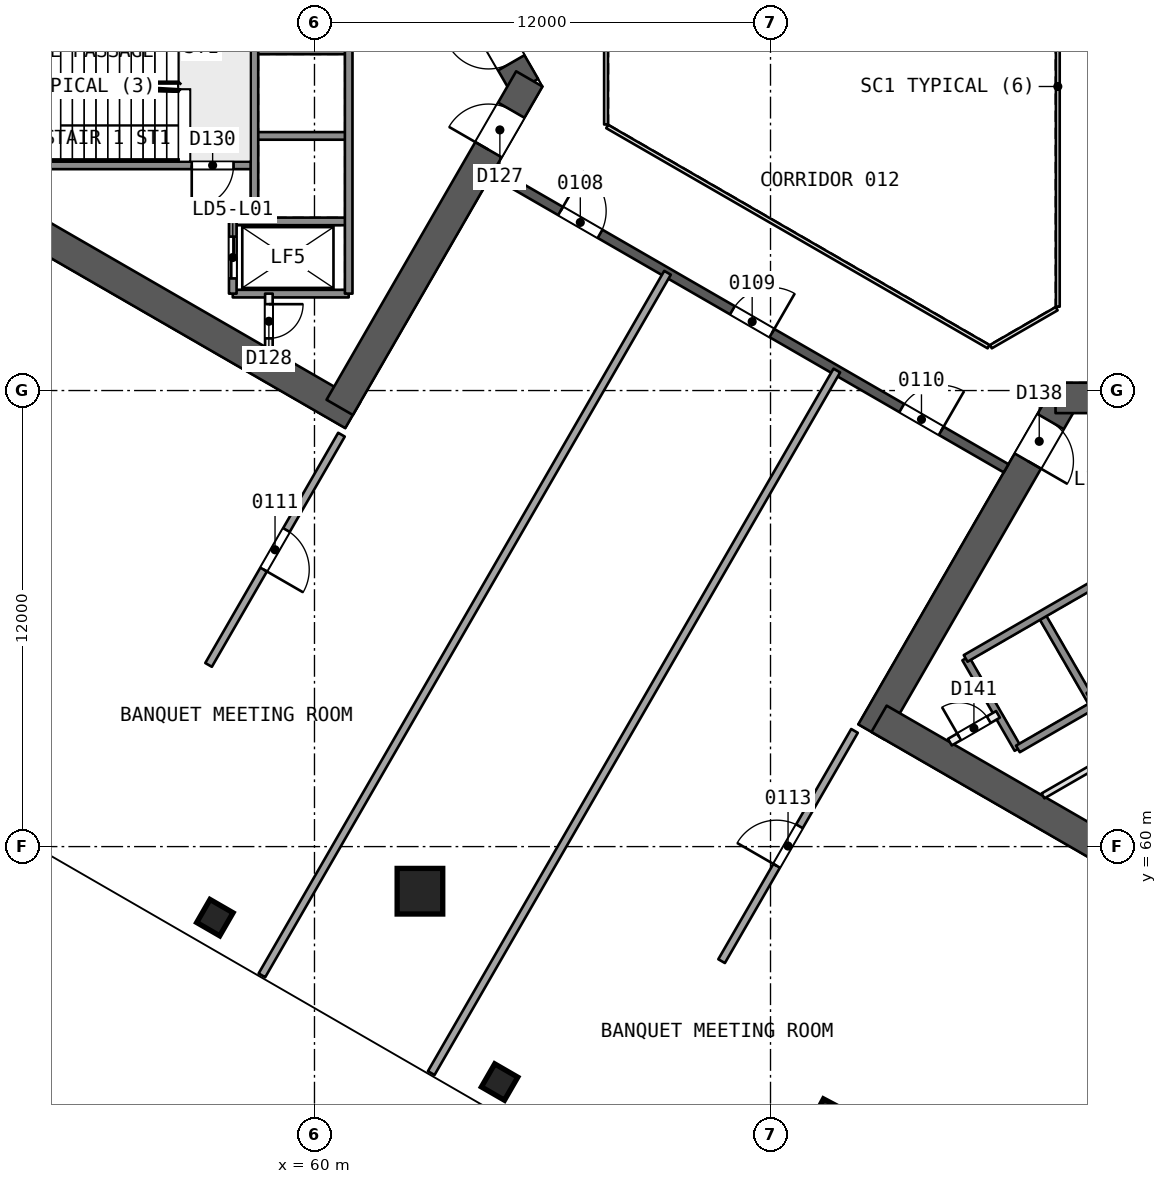
"""IFC4 building model, lengths in metres.
Left out: names, types, materials, properties, quantities, classifications, styles, units other than length and angle.
Written with IfcOpenShell. Run it as: python <this file> out.ifc"""

import sys

from ifc_helpers import new_model, si_unit, direction, frame, frame_2d, origin, origin_2d, place, context, subcontext, project, spatial, rectangle, extrude, element, fill, save


model = new_model("IFC4")
c1 = context("Model", 3, precision=1e-05, world=origin(), true_north=direction((0.0, 1.0)))
c2 = subcontext(c1, "Body", "Model", "MODEL_VIEW")
j1 = project(units=[si_unit("LENGTHUNIT", "METRE"), si_unit("PLANEANGLEUNIT", "RADIAN")], contexts=[c1])
p1 = place(None, origin())
s1 = spatial("IfcSite", under=j1, at=p1, CompositionType="ELEMENT")
p2 = place(p1, origin())
s2 = spatial("IfcBuilding", under=s1, at=p2, CompositionType="ELEMENT")
p3 = place(p2, frame((0.0, 0.0, 9.0)))
s3 = spatial("IfcBuildingStorey", under=s2, at=p3, CompositionType="ELEMENT", Elevation=9.0)
p4 = place(p3, frame((65.538, 80.0, 0.0), z_axis=(0.0, 0.0, 1.0), x_axis=(-0.49999662545, 0.866027352073, 0.0)))
e1 = element("IfcWall", 1, at=p4, inside=s3, PredefinedType="SHEAR", context=c2, shape_type="SweptSolid", body=[
    extrude(rectangle(XDim=10.149, YDim=0.8, at=frame_2d((5.074, 0.0))), origin(), (0.0, 0.0, 1.0), 6.0),
])
p5 = place(p4, frame((0.719, 0.0, 0.0)))
e2 = element("IfcOpeningElement", 2, at=p5, cuts=e1, PredefinedType="OPENING", context=c2, shape_type="SweptSolid", body=[
    extrude(rectangle(XDim=1.2, YDim=2.1, at=frame_2d((0.6, 1.05))), frame((0.0, 0.411, 0.0), z_axis=(0.0, -1.0, 0.0), x_axis=(1.0, 0.0, 0.0)), (0.0, 0.0, 1.0), 0.821),
])
p6 = place(p3, frame((48.797, 78.408, 0.0), z_axis=(0.0, 0.0, 1.0), x_axis=(0.866032504327, -0.499987701298, 0.0)))
e3 = element("IfcWall", 3, at=p6, inside=s3, PredefinedType="SHEAR", context=c2, shape_type="SweptSolid", body=[
    extrude(rectangle(XDim=14.102, YDim=0.8, at=frame_2d((7.051, 0.0))), origin(), (0.0, 0.0, 1.0), 6.0),
])
p7 = place(p3, frame((60.664, 71.557, 0.0), z_axis=(0.0, 0.0, 1.0), x_axis=(0.50000409368, 0.866023040284, 0.0)))
e4 = element("IfcWall", 4, at=p7, inside=s3, PredefinedType="SHEAR", context=c2, shape_type="SweptSolid", body=[
    extrude(rectangle(XDim=9.98, YDim=0.8, at=frame_2d((4.99, 0.0))), origin(), (0.0, 0.0, 1.0), 6.0),
])
p8 = place(p7, frame((7.83, 0.0, 0.0)))
e5 = element("IfcOpeningElement", 5, at=p8, cuts=e4, PredefinedType="OPENING", context=c2, shape_type="SweptSolid", body=[
    extrude(rectangle(XDim=1.2, YDim=2.1, at=frame_2d((0.6, 1.05))), frame((0.0, 0.411, 0.0), z_axis=(0.0, -1.0, 0.0), x_axis=(1.0, 0.0, 0.0)), (0.0, 0.0, 1.0), 0.821),
])
p9 = place(p3, frame((79.731, 71.806, 0.0), z_axis=(0.0, 0.0, 1.0), x_axis=(-0.49999662545, -0.866027352073, 0.0)))
e6 = element("IfcWall", 6, at=p9, inside=s3, PredefinedType="SHEAR", context=c2, shape_type="SweptSolid", body=[
    extrude(rectangle(XDim=10.149, YDim=0.8, at=frame_2d((5.074, 0.0))), origin(), (0.0, 0.0, 1.0), 6.0),
])
p10 = place(p9, frame((0.719, 0.0, 0.0)))
e7 = element("IfcOpeningElement", 7, at=p10, cuts=e6, PredefinedType="OPENING", context=c2, shape_type="SweptSolid", body=[
    extrude(rectangle(XDim=1.2, YDim=2.1, at=frame_2d((0.6, 1.05))), frame((0.0, 0.411, 0.0), z_axis=(0.0, -1.0, 0.0), x_axis=(1.0, 0.0, 0.0)), (0.0, 0.0, 1.0), 0.821),
])
p11 = place(p3, frame((74.856, 63.363, 0.0), z_axis=(0.0, 0.0, 1.0), x_axis=(0.866029478545, -0.499992942241, 0.0)))
e8 = element("IfcWall", 8, at=p11, inside=s3, PredefinedType="SHEAR", context=c2, shape_type="SweptSolid", body=[
    extrude(rectangle(XDim=13.933, YDim=0.8, at=frame_2d((6.967, 0.0))), origin(), (0.0, 0.0, 1.0), 6.0),
])
p12 = place(p3, frame((89.48, 71.806, 0.0), z_axis=(0.0, 0.0, 1.0), x_axis=(-1.0, 0.0, 0.0)))
e9 = element("IfcWall", 9, at=p12, inside=s3, PredefinedType="SHEAR", context=c2, shape_type="SweptSolid", body=[
    extrude(rectangle(XDim=9.98, YDim=0.8, at=frame_2d((4.99, 0.0))), origin(), (0.0, 0.0, 1.0), 6.0),
])
p13 = place(p12, frame((7.83, 0.0, 0.0)))
e10 = element("IfcOpeningElement", 10, at=p13, cuts=e9, PredefinedType="OPENING", context=c2, shape_type="SweptSolid", body=[
    extrude(rectangle(XDim=1.2, YDim=2.1, at=frame_2d((0.6, 1.05))), frame((0.0, 0.411, 0.0), z_axis=(0.0, -1.0, 0.0), x_axis=(1.0, 0.0, 0.0)), (0.0, 0.0, 1.0), 0.821),
])
p14 = place(p3, frame((64.7, 77.748, 0.0), z_axis=(0.0, 0.0, 1.0), x_axis=(0.866026492143, -0.499998114903, 0.0)))
e11 = element("IfcWall", 11, at=p14, inside=s3, PredefinedType="SHEAR", context=c2, shape_type="SweptSolid", body=[
    extrude(rectangle(XDim=15.588, YDim=0.25, at=frame_2d((7.794, 0.0))), origin(), (0.0, 0.0, 1.0), 5.6),
])
p15 = place(p14, frame((2.05, 0.0, 0.0)))
e12 = element("IfcOpeningElement", 12, at=p15, cuts=e11, PredefinedType="OPENING", context=c2, shape_type="SweptSolid", body=[
    extrude(rectangle(XDim=1.2, YDim=2.4, at=frame_2d((0.6, 1.2))), frame((0.0, 0.135, 0.0), z_axis=(0.0, -1.0, 0.0), x_axis=(1.0, 0.0, 0.0)), (0.0, 0.0, 1.0), 0.271),
])
p16 = place(p14, frame((7.272, 0.0, 0.0)))
e13 = element("IfcOpeningElement", 13, at=p16, cuts=e11, PredefinedType="OPENING", context=c2, shape_type="SweptSolid", body=[
    extrude(rectangle(XDim=1.2, YDim=2.4, at=frame_2d((0.6, 1.2))), frame((0.0, 0.135, 0.0), z_axis=(0.0, -1.0, 0.0), x_axis=(1.0, 0.0, 0.0)), (0.0, 0.0, 1.0), 0.271),
])
p17 = place(p14, frame((12.417, 0.0, 0.0)))
e14 = element("IfcOpeningElement", 14, at=p17, cuts=e11, PredefinedType="OPENING", context=c2, shape_type="SweptSolid", body=[
    extrude(rectangle(XDim=1.2, YDim=2.4, at=frame_2d((0.6, 1.2))), frame((0.0, 0.135, 0.0), z_axis=(0.0, -1.0, 0.0), x_axis=(1.0, 0.0, 0.0)), (0.0, 0.0, 1.0), 0.271),
])
p18 = place(p3, frame((62.763, 58.805, 0.0), z_axis=(0.010089088034, 0.017493176833, 0.999796078742), x_axis=(-0.866252907906, 0.499605744107, 1.0221e-08)))
e15 = element("IfcColumn", 15, at=p18, inside=s3, PredefinedType="COLUMN", context=c2, shape_type="SweptSolid", body=[
    extrude(rectangle(XDim=1.2, YDim=1.2, at=origin_2d()), origin(), (0.0, 0.0, 1.0), 6.001),
])
p19 = place(p3, frame((73.644, 52.523, 0.0), z_axis=(0.000854269334, 0.022821195063, 0.999739197631), x_axis=(-0.49982434175, -0.865891374883, 0.02019292694)))
e16 = element("IfcColumn", 16, at=p19, inside=s3, PredefinedType="COLUMN", context=c2, shape_type="SweptSolid", body=[
    extrude(rectangle(XDim=1.2, YDim=1.2, at=origin_2d()), origin(), (0.0, 0.0, 1.0), 6.001),
])
for number, where, z_axis, x_axis in (
    (17, (57.379, 58.131, 0.0), (0.0, 0.0, 1.0), (0.5, 0.866, 0.0)),
    (18, (64.871, 53.805, 0.0), (0.0, 0.0, 1.0), (0.5, 0.866, 0.0)),
):
    element("IfcColumn", number, at=place(p3, frame(where, z_axis=z_axis, x_axis=x_axis)), inside=s3, PredefinedType="COLUMN", context=c2, shape_type="SweptSolid", body=[
        extrude(rectangle(XDim=0.7, YDim=0.7, at=origin_2d()), origin(), (0.0, 0.0, 1.0), 6.0),
    ])
p20 = place(p3, frame((58.617, 56.612, 0.0), z_axis=(0.0, 0.0, 1.0), x_axis=(0.500000322675, 0.866025217488, 0.0)))
e19 = element("IfcWall", 19, at=p20, inside=s3, PredefinedType="PARTITIONING", context=c2, shape_type="SweptSolid", body=[
    extrude(rectangle(XDim=21.346, YDim=0.2, at=frame_2d((10.673, 0.0))), origin(), (0.0, 0.0, 1.0), 5.6),
])
p21 = place(p3, frame((60.71, 70.838, 0.0), z_axis=(0.0, 0.0, 1.0), x_axis=(-0.499979261727, -0.866037376701, 0.0)))
e20 = element("IfcWall", 20, at=p21, inside=s3, PredefinedType="PARTITIONING", context=c2, shape_type="SweptSolid", body=[
    extrude(rectangle(XDim=6.995, YDim=0.2, at=frame_2d((3.498, 0.0))), origin(), (0.0, 0.0, 1.0), 5.6),
])
p22 = place(p21, frame((2.897, 0.0, 0.0)))
e21 = element("IfcOpeningElement", 21, at=p22, cuts=e20, PredefinedType="OPENING", context=c2, shape_type="SweptSolid", body=[
    extrude(rectangle(XDim=1.2, YDim=2.4, at=frame_2d((0.6, 1.2))), frame((0.0, 0.11, 0.0), z_axis=(0.0, -1.0, 0.0), x_axis=(1.0, 0.0, 0.0)), (0.0, 0.0, 1.0), 0.221),
])
p23 = place(p3, frame((63.072, 54.04, 0.0), z_axis=(0.0, 0.0, 1.0), x_axis=(0.500005275173, 0.86602235814, 0.0)))
e22 = element("IfcWall", 22, at=p23, inside=s3, PredefinedType="PARTITIONING", context=c2, shape_type="SweptSolid", body=[
    extrude(rectangle(XDim=21.346, YDim=0.2, at=frame_2d((10.673, 0.0))), origin(), (0.0, 0.0, 1.0), 5.6),
])
p24 = place(p3, frame((70.713, 56.986, 0.0), z_axis=(0.0, 0.0, 1.0), x_axis=(0.499979261727, 0.866037376701, 0.0)))
e23 = element("IfcWall", 23, at=p24, inside=s3, PredefinedType="PARTITIONING", context=c2, shape_type="SweptSolid", body=[
    extrude(rectangle(XDim=6.995, YDim=0.2, at=frame_2d((3.498, 0.0))), origin(), (0.0, 0.0, 1.0), 5.6),
])
p25 = place(p24, frame((2.897, 0.0, 0.0)))
e24 = element("IfcOpeningElement", 24, at=p25, cuts=e23, PredefinedType="OPENING", context=c2, shape_type="SweptSolid", body=[
    extrude(rectangle(XDim=1.2, YDim=2.4, at=frame_2d((0.6, 1.2))), frame((0.0, 0.11, 0.0), z_axis=(0.0, -1.0, 0.0), x_axis=(1.0, 0.0, 0.0)), (0.0, 0.0, 1.0), 0.221),
])
for number, where, z_axis, x_axis in (
    (25, (60.9, 80.95, 0.0), (0.0, 0.0, 1.0), (-1.0, 0.0, 0.0)),
    (26, (60.9, 78.7, 0.0), (0.0, 0.0, 1.0), (-1.0, 0.0, 0.0)),
):
    element("IfcWall", number, at=place(p3, frame(where, z_axis=z_axis, x_axis=x_axis)), inside=s3, PredefinedType="SOLIDWALL", context=c2, shape_type="SweptSolid", body=[
        extrude(rectangle(XDim=2.48, YDim=0.2, at=frame_2d((1.24, 0.0))), origin(), (0.0, 0.0, 1.0), 5.6),
    ])
p26 = place(p3, frame((58.42, 77.925, 0.0), z_axis=(0.0, 0.0, 1.0), x_axis=(-1.0, 0.0, 0.0)))
e27 = element("IfcWall", 27, at=p26, inside=s3, PredefinedType="SOLIDWALL", context=c2, shape_type="SweptSolid", body=[
    extrude(rectangle(XDim=7.7, YDim=0.2, at=frame_2d((3.85, 0.0))), origin(), (0.0, 0.0, 1.0), 5.6),
])
p27 = place(p26, frame((0.55, 0.0, 0.0)))
e28 = element("IfcOpeningElement", 28, at=p27, cuts=e27, PredefinedType="OPENING", context=c2, shape_type="SweptSolid", body=[
    extrude(rectangle(XDim=1.1, YDim=2.1, at=frame_2d((0.55, 1.05))), frame((0.0, 0.11, 0.0), z_axis=(0.0, -1.0, 0.0), x_axis=(1.0, 0.0, 0.0)), (0.0, 0.0, 1.0), 0.221),
])
for number, where, z_axis, x_axis in (
    (29, (60.9, 76.45, 0.0), (0.0, 0.0, 1.0), (-1.0, 0.0, 0.0)),
    (30, (60.9, 74.55, 0.0), (0.0, 0.0, 1.0), (-1.0, 0.0, 0.0)),
):
    element("IfcWall", number, at=place(p3, frame(where, z_axis=z_axis, x_axis=x_axis)), inside=s3, PredefinedType="SOLIDWALL", context=c2, shape_type="SweptSolid", body=[
        extrude(rectangle(XDim=3.05, YDim=0.2, at=frame_2d((1.525, 0.0))), origin(), (0.0, 0.0, 1.0), 5.6),
    ])
p28 = place(p3, frame((60.9, 85.45, 0.0), z_axis=(0.0, 0.0, 1.0), x_axis=(0.0, -1.0, 0.0)))
e31 = element("IfcWall", 31, at=p28, inside=s3, PredefinedType="SOLIDWALL", context=c2, shape_type="SweptSolid", body=[
    extrude(rectangle(XDim=10.9, YDim=0.2, at=frame_2d((5.45, 0.0))), origin(), (0.0, 0.0, 1.0), 5.6),
])
p29 = place(p3, frame((58.8, 74.55, 0.0), z_axis=(0.0, 0.0, 1.0), x_axis=(0.0, -1.0, 0.0)))
e32 = element("IfcWall", 32, at=p29, inside=s3, PredefinedType="PARTITIONING", context=c2, shape_type="SweptSolid", body=[
    extrude(rectangle(XDim=1.455, YDim=0.2, at=frame_2d((0.728, 0.0))), origin(), (0.0, 0.0, 1.0), 5.6),
])
p30 = place(p29, frame((0.278, 0.0, 0.0)))
e33 = element("IfcOpeningElement", 33, at=p30, cuts=e32, PredefinedType="OPENING", context=c2, shape_type="SweptSolid", body=[
    extrude(rectangle(XDim=0.9, YDim=2.1, at=frame_2d((0.45, 1.05))), frame((0.0, 0.11, 0.0), z_axis=(0.0, -1.0, 0.0), x_axis=(1.0, 0.0, 0.0)), (0.0, 0.0, 1.0), 0.221),
])
p31 = place(p3, frame((58.42, 85.45, 0.0), z_axis=(0.0, 0.0, 1.0), x_axis=(0.0, -1.0, 0.0)))
e34 = element("IfcWall", 34, at=p31, inside=s3, PredefinedType="SOLIDWALL", context=c2, shape_type="SweptSolid", body=[
    extrude(rectangle(XDim=9.0, YDim=0.2, at=frame_2d((4.5, 0.0))), origin(), (0.0, 0.0, 1.0), 5.6),
])
p32 = place(p3, frame((57.85, 76.45, 0.0), z_axis=(0.0, 0.0, 1.0), x_axis=(0.0, -1.0, 0.0)))
e35 = element("IfcWall", 35, at=p32, inside=s3, PredefinedType="SOLIDWALL", context=c2, shape_type="SweptSolid", body=[
    extrude(rectangle(XDim=1.9, YDim=0.2, at=frame_2d((0.95, 0.0))), origin(), (0.0, 0.0, 1.0), 5.6),
])
p33 = place(p32, frame((0.4, 0.0, 0.0)))
e36 = element("IfcOpeningElement", 36, at=p33, cuts=e35, PredefinedType="OPENING", context=c2, shape_type="SweptSolid", body=[
    extrude(rectangle(XDim=1.1, YDim=2.1, at=frame_2d((0.55, 1.05))), frame((0.0, 0.11, 0.0), z_axis=(0.0, -1.0, 0.0), x_axis=(1.0, 0.0, 0.0)), (0.0, 0.0, 1.0), 0.221),
])
for number, where, z_axis, x_axis in (
    (37, (77.135, 64.952, 0.0), (0.0, 0.0, 1.0), (0.5, -0.866, 0.0)),
    (38, (79.127, 66.102, 0.0), (0.0, 0.0, 1.0), (0.5, -0.866, 0.0)),
):
    element("IfcWall", number, at=place(p3, frame(where, z_axis=z_axis, x_axis=x_axis)), inside=s3, PredefinedType="SOLIDWALL", context=c2, shape_type="SweptSolid", body=[
        extrude(rectangle(XDim=2.75, YDim=0.2, at=frame_2d((1.375, 0.0))), origin(), (0.0, 0.0, 1.0), 5.6),
    ])
p34 = place(p3, frame((77.135, 64.952, 0.0), z_axis=(0.0, 0.0, 1.0), x_axis=(0.866031916153, 0.499988720078, 0.0)))
e39 = element("IfcWall", 39, at=p34, inside=s3, PredefinedType="SOLIDWALL", context=c2, shape_type="SweptSolid", body=[
    extrude(rectangle(XDim=11.35, YDim=0.2, at=frame_2d((5.675, 0.0))), origin(), (0.0, 0.0, 1.0), 5.6),
])
p35 = place(p3, frame((76.72, 62.749, 0.0), z_axis=(0.0, 0.0, 1.0), x_axis=(0.866054810376, 0.49994906283, 0.0)))
e40 = element("IfcWall", 40, at=p35, inside=s3, PredefinedType="PARTITIONING", context=c2, shape_type="SweptSolid", body=[
    extrude(rectangle(XDim=1.461, YDim=0.2, at=frame_2d((0.73, 0.0))), origin(), (0.0, 0.0, 1.0), 5.6),
])
p36 = place(p35, frame((0.281, 0.0, 0.0)))
e41 = element("IfcOpeningElement", 41, at=p36, cuts=e40, PredefinedType="OPENING", context=c2, shape_type="SweptSolid", body=[
    extrude(rectangle(XDim=0.9, YDim=2.1, at=frame_2d((0.45, 1.05))), frame((0.0, 0.11, 0.0), z_axis=(0.0, -1.0, 0.0), x_axis=(1.0, 0.0, 0.0)), (0.0, 0.0, 1.0), 0.221),
])
p37 = place(p3, frame((80.367, 63.954, 0.0), z_axis=(0.0, 0.0, 1.0), x_axis=(0.866026575979, 0.499997969693, 0.0)))
e42 = element("IfcWall", 42, at=p37, inside=s3, PredefinedType="SOLIDWALL", context=c2, shape_type="SweptSolid", body=[
    extrude(rectangle(XDim=6.75, YDim=0.2, at=frame_2d((3.375, 0.0))), origin(), (0.0, 0.0, 1.0), 5.6),
])
p38 = place(p3, frame((78.51, 62.57, 0.0), z_axis=(0.0, 0.0, 1.0), x_axis=(0.866053019151, 0.499952165731, 0.0)))
e43 = element("IfcWall", 43, at=p38, inside=s3, PredefinedType="SOLIDWALL", context=c2, shape_type="SweptSolid", body=[
    extrude(rectangle(XDim=2.3, YDim=0.2, at=frame_2d((1.15, 0.0))), origin(), (0.0, 0.0, 1.0), 5.6),
])
p39 = place(p3, frame((79.17, 61.334, 0.0), z_axis=(0.0, 0.0, 1.0), x_axis=(0.866030041738, 0.499991966744, 0.0)))
e44 = element("IfcWall", 44, at=p39, inside=s3, PredefinedType="PARTITIONING", context=c2, shape_type="SweptSolid", body=[
    extrude(rectangle(XDim=2.222, YDim=0.15, at=frame_2d((1.111, 0.0))), origin(), (0.0, 0.0, 1.0), 5.6),
])
p40 = place(p3, frame((79.56, 74.206, 0.0), z_axis=(0.0, 0.0, 1.0), x_axis=(0.0, 1.0, 0.0)))
e45 = element("IfcWall", 45, at=p40, inside=s3, PredefinedType="PARTITIONING", context=c2, shape_type="SweptSolid", body=[
    extrude(rectangle(XDim=11.588, YDim=0.1, at=frame_2d((5.794, 0.0))), origin(), (0.0, 0.0, 1.0), 5.6),
])
p41 = place(p3, frame((67.672, 81.0, 0.0), z_axis=(0.0, 0.0, 1.0), x_axis=(0.0, -1.0, 0.0)))
e46 = element("IfcWall", 46, at=p41, inside=s3, PredefinedType="PARTITIONING", context=c2, shape_type="SweptSolid", body=[
    extrude(rectangle(XDim=2.0, YDim=0.1, at=frame_2d((1.0, 0.0))), origin(), (0.0, 0.0, 1.0), 5.6),
])
p42 = place(p3, frame((67.702, 78.948, 0.0), z_axis=(0.0, 0.0, 1.0), x_axis=(0.866026658274, -0.499997827154, 0.0)))
e47 = element("IfcWall", 47, at=p42, inside=s3, PredefinedType="PARTITIONING", context=c2, shape_type="SweptSolid", body=[
    extrude(rectangle(XDim=11.588, YDim=0.1, at=frame_2d((5.794, 0.0))), origin(), (0.0, 0.0, 1.0), 5.6),
])
p43 = place(p3, frame((77.798, 73.154, 0.0), z_axis=(0.0, 0.0, 1.0), x_axis=(0.866041268327, 0.499972520799, 0.0)))
e48 = element("IfcWall", 48, at=p43, inside=s3, PredefinedType="PARTITIONING", context=c2, shape_type="SweptSolid", body=[
    extrude(rectangle(XDim=2.0, YDim=0.1, at=frame_2d((1.0, 0.0))), origin(), (0.0, 0.0, 1.0), 5.6),
])
p44 = place(p3, frame((57.191, 52.754, 0.0), z_axis=(0.0, 0.0, 1.0), x_axis=(0.866025403784, -0.5, 0.0)))
e49 = element("IfcColumn", 49, at=p44, inside=s3, PredefinedType="COLUMN", context=c2, shape_type="SweptSolid", body=[
    extrude(rectangle(XDim=1.0, YDim=1.0, at=origin_2d()), origin(), (0.0, 0.0, 1.0), 4.7),
])
p45 = place(p15, origin())
e50 = element("IfcDoor", 50, at=p45, inside=s3, OperationType="SINGLE_SWING_LEFT", PredefinedType="NOTDEFINED", context=c2, shape_type="SweptSolid", body=[
    extrude(rectangle(XDim=1.2, YDim=2.4, at=frame_2d((0.6, 1.2))), frame((0.0, 0.025, 0.0), z_axis=(0.0, -1.0, 0.0), x_axis=(1.0, 0.0, 0.0)), (0.0, 0.0, 1.0), 0.05),
])
fill(e12, e50)
p46 = place(p16, origin())
e51 = element("IfcDoor", 51, at=p46, inside=s3, OperationType="SINGLE_SWING_RIGHT", PredefinedType="NOTDEFINED", context=c2, shape_type="SweptSolid", body=[
    extrude(rectangle(XDim=1.2, YDim=2.4, at=frame_2d((0.6, 1.2))), frame((0.0, 0.025, 0.0), z_axis=(0.0, -1.0, 0.0), x_axis=(1.0, 0.0, 0.0)), (0.0, 0.0, 1.0), 0.05),
])
fill(e13, e51)
p47 = place(p17, origin())
e52 = element("IfcDoor", 52, at=p47, inside=s3, OperationType="SINGLE_SWING_RIGHT", PredefinedType="NOTDEFINED", context=c2, shape_type="SweptSolid", body=[
    extrude(rectangle(XDim=1.2, YDim=2.4, at=frame_2d((0.6, 1.2))), frame((0.0, 0.025, 0.0), z_axis=(0.0, -1.0, 0.0), x_axis=(1.0, 0.0, 0.0)), (0.0, 0.0, 1.0), 0.05),
])
fill(e14, e52)
p48 = place(p22, origin())
e53 = element("IfcDoor", 53, at=p48, inside=s3, OperationType="SINGLE_SWING_RIGHT", PredefinedType="NOTDEFINED", context=c2, shape_type="SweptSolid", body=[
    extrude(rectangle(XDim=1.2, YDim=2.4, at=frame_2d((0.6, 1.2))), frame((0.0, 0.025, 0.0), z_axis=(0.0, -1.0, 0.0), x_axis=(1.0, 0.0, 0.0)), (0.0, 0.0, 1.0), 0.05),
])
fill(e21, e53)
p49 = place(p25, origin())
e54 = element("IfcDoor", 54, at=p49, inside=s3, OperationType="SINGLE_SWING_LEFT", PredefinedType="NOTDEFINED", context=c2, shape_type="SweptSolid", body=[
    extrude(rectangle(XDim=1.2, YDim=2.4, at=frame_2d((0.6, 1.2))), frame((0.0, 0.025, 0.0), z_axis=(0.0, -1.0, 0.0), x_axis=(1.0, 0.0, 0.0)), (0.0, 0.0, 1.0), 0.05),
])
fill(e24, e54)
p50 = place(p5, origin())
e55 = element("IfcDoor", 55, at=p50, inside=s3, OperationType="SINGLE_SWING_RIGHT", PredefinedType="NOTDEFINED", context=c2, shape_type="SweptSolid", body=[
    extrude(rectangle(XDim=1.2, YDim=2.1, at=frame_2d((0.6, 1.05))), frame((0.0, 0.025, 0.0), z_axis=(0.0, -1.0, 0.0), x_axis=(1.0, 0.0, 0.0)), (0.0, 0.0, 1.0), 0.05),
])
fill(e2, e55)
p51 = place(p8, origin())
e56 = element("IfcDoor", 56, at=p51, inside=s3, OperationType="SINGLE_SWING_LEFT", PredefinedType="NOTDEFINED", context=c2, shape_type="SweptSolid", body=[
    extrude(rectangle(XDim=1.2, YDim=2.1, at=frame_2d((0.6, 1.05))), frame((0.0, 0.025, 0.0), z_axis=(0.0, -1.0, 0.0), x_axis=(1.0, 0.0, 0.0)), (0.0, 0.0, 1.0), 0.05),
])
fill(e5, e56)
p52 = place(p33, origin())
e57 = element("IfcDoor", 57, at=p52, inside=s3, OperationType="SLIDING_TO_RIGHT", PredefinedType="NOTDEFINED", context=c2, shape_type="SweptSolid", body=[
    extrude(rectangle(XDim=1.1, YDim=2.1, at=frame_2d((0.55, 1.05))), frame((0.0, 0.025, 0.0), z_axis=(0.0, -1.0, 0.0), x_axis=(1.0, 0.0, 0.0)), (0.0, 0.0, 1.0), 0.05),
])
fill(e36, e57)
p53 = place(p30, origin())
e58 = element("IfcDoor", 58, at=p53, inside=s3, OperationType="SINGLE_SWING_LEFT", PredefinedType="NOTDEFINED", context=c2, shape_type="SweptSolid", body=[
    extrude(rectangle(XDim=0.9, YDim=2.1, at=frame_2d((0.45, 1.05))), frame((0.0, 0.025, 0.0), z_axis=(0.0, -1.0, 0.0), x_axis=(1.0, 0.0, 0.0)), (0.0, 0.0, 1.0), 0.05),
])
fill(e33, e58)
p54 = place(p27, origin())
e59 = element("IfcDoor", 59, at=p54, inside=s3, OperationType="SINGLE_SWING_RIGHT", PredefinedType="NOTDEFINED", context=c2, shape_type="SweptSolid", body=[
    extrude(rectangle(XDim=1.1, YDim=2.1, at=frame_2d((0.55, 1.05))), frame((0.0, 0.025, 0.0), z_axis=(0.0, -1.0, 0.0), x_axis=(1.0, 0.0, 0.0)), (0.0, 0.0, 1.0), 0.05),
])
fill(e28, e59)
p55 = place(p10, origin())
e60 = element("IfcDoor", 60, at=p55, inside=s3, OperationType="SINGLE_SWING_RIGHT", PredefinedType="NOTDEFINED", context=c2, shape_type="SweptSolid", body=[
    extrude(rectangle(XDim=1.2, YDim=2.1, at=frame_2d((0.6, 1.05))), frame((0.0, 0.025, 0.0), z_axis=(0.0, -1.0, 0.0), x_axis=(1.0, 0.0, 0.0)), (0.0, 0.0, 1.0), 0.05),
])
fill(e7, e60)
p56 = place(p36, origin())
e61 = element("IfcDoor", 61, at=p56, inside=s3, OperationType="SINGLE_SWING_LEFT", PredefinedType="NOTDEFINED", context=c2, shape_type="SweptSolid", body=[
    extrude(rectangle(XDim=0.9, YDim=2.1, at=frame_2d((0.45, 1.05))), frame((0.0, 0.025, 0.0), z_axis=(0.0, -1.0, 0.0), x_axis=(1.0, 0.0, 0.0)), (0.0, 0.0, 1.0), 0.05),
])
fill(e41, e61)
save(model, sys.argv[1])
